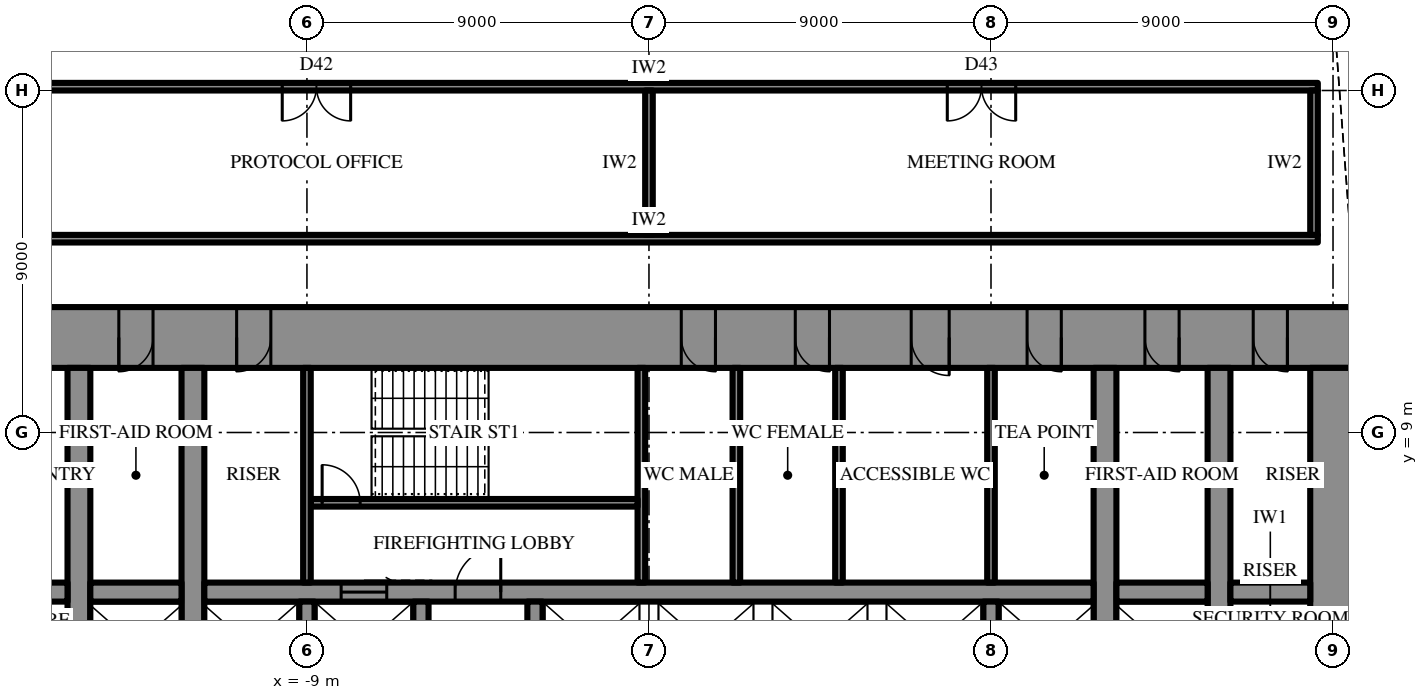
"""IFC4 building model, lengths in metres.
Left out: names, types, materials, properties, quantities, classifications, styles, units other than length and angle.
Written with IfcOpenShell. Run it as: python <this file> out.ifc"""

import sys

from ifc_helpers import new_model, si_unit, direction, frame, frame_2d, origin, place, context, subcontext, project, spatial, rectangle, extrude, element, fill, save


model = new_model("IFC4")
c1 = context("Model", 3, precision=1e-05, world=origin(), true_north=direction((0.0, 1.0)))
c2 = subcontext(c1, "Body", "Model", "MODEL_VIEW")
j1 = project(units=[si_unit("LENGTHUNIT", "METRE"), si_unit("PLANEANGLEUNIT", "RADIAN")], contexts=[c1])
p1 = place(None, origin())
s1 = spatial("IfcSite", under=j1, at=p1, CompositionType="ELEMENT")
p2 = place(p1, origin())
s2 = spatial("IfcBuilding", under=s1, at=p2, CompositionType="ELEMENT")
p3 = place(p2, frame((0.0, 0.0, 186.7)))
s3 = spatial("IfcBuildingStorey", under=s2, at=p3, CompositionType="ELEMENT", Elevation=186.7)
p4 = place(p3, frame((-18.6, 11.5, 0.0), z_axis=(0.0, 0.0, 1.0), x_axis=(1.0, 0.0, 0.0)))
e1 = element("IfcWall", 1, at=p4, inside=s3, PredefinedType="SHEAR", context=c2, shape_type="SweptSolid", body=[
    extrude(rectangle(XDim=37.2, YDim=1.6, at=frame_2d((18.6, 0.0))), origin(), (0.0, 0.0, 1.0), 4.2),
])
p5 = place(p4, frame((19.45, 0.0, 0.0)))
e2 = element("IfcOpeningElement", 2, at=p5, cuts=e1, PredefinedType="OPENING", context=c2, shape_type="SweptSolid", body=[
    extrude(rectangle(XDim=0.9, YDim=2.2, at=frame_2d((0.45, 1.1))), frame((0.0, 0.81, 0.0), z_axis=(0.0, -1.0, 0.0), x_axis=(1.0, 0.0, 0.0)), (0.0, 0.0, 1.0), 1.62),
])
p6 = place(p4, frame((22.45, 0.0, 0.0)))
e3 = element("IfcOpeningElement", 3, at=p6, cuts=e1, PredefinedType="OPENING", context=c2, shape_type="SweptSolid", body=[
    extrude(rectangle(XDim=0.9, YDim=2.2, at=frame_2d((0.45, 1.1))), frame((0.0, 0.81, 0.0), z_axis=(0.0, -1.0, 0.0), x_axis=(1.0, 0.0, 0.0)), (0.0, 0.0, 1.0), 1.62),
])
p7 = place(p4, frame((25.5, 0.0, 0.0)))
e4 = element("IfcOpeningElement", 4, at=p7, cuts=e1, PredefinedType="OPENING", context=c2, shape_type="SweptSolid", body=[
    extrude(rectangle(XDim=1.0, YDim=2.2, at=frame_2d((0.5, 1.1))), frame((0.0, 0.81, 0.0), z_axis=(0.0, -1.0, 0.0), x_axis=(1.0, 0.0, 0.0)), (0.0, 0.0, 1.0), 1.62),
])
p8 = place(p4, frame((1.8, 0.0, 0.0)))
e5 = element("IfcOpeningElement", 5, at=p8, cuts=e1, PredefinedType="OPENING", context=c2, shape_type="SweptSolid", body=[
    extrude(rectangle(XDim=0.9, YDim=2.2, at=frame_2d((0.45, 1.1))), frame((0.0, 0.81, 0.0), z_axis=(0.0, -1.0, 0.0), x_axis=(1.0, 0.0, 0.0)), (0.0, 0.0, 1.0), 1.62),
])
p9 = place(p4, frame((4.65, 0.0, 0.0)))
e6 = element("IfcOpeningElement", 6, at=p9, cuts=e1, PredefinedType="OPENING", context=c2, shape_type="SweptSolid", body=[
    extrude(rectangle(XDim=0.9, YDim=2.2, at=frame_2d((0.45, 1.1))), frame((0.0, 0.81, 0.0), z_axis=(0.0, -1.0, 0.0), x_axis=(1.0, 0.0, 0.0)), (0.0, 0.0, 1.0), 1.62),
])
p10 = place(p4, frame((7.75, 0.0, 0.0)))
e7 = element("IfcOpeningElement", 7, at=p10, cuts=e1, PredefinedType="OPENING", context=c2, shape_type="SweptSolid", body=[
    extrude(rectangle(XDim=0.9, YDim=2.2, at=frame_2d((0.45, 1.1))), frame((0.0, 0.81, 0.0), z_axis=(0.0, -1.0, 0.0), x_axis=(1.0, 0.0, 0.0)), (0.0, 0.0, 1.0), 1.62),
])
p11 = place(p4, frame((28.55, 0.0, 0.0)))
e8 = element("IfcOpeningElement", 8, at=p11, cuts=e1, PredefinedType="OPENING", context=c2, shape_type="SweptSolid", body=[
    extrude(rectangle(XDim=0.9, YDim=2.2, at=frame_2d((0.45, 1.1))), frame((0.0, 0.81, 0.0), z_axis=(0.0, -1.0, 0.0), x_axis=(1.0, 0.0, 0.0)), (0.0, 0.0, 1.0), 1.62),
])
p12 = place(p4, frame((31.65, 0.0, 0.0)))
e9 = element("IfcOpeningElement", 9, at=p12, cuts=e1, PredefinedType="OPENING", context=c2, shape_type="SweptSolid", body=[
    extrude(rectangle(XDim=0.9, YDim=2.2, at=frame_2d((0.45, 1.1))), frame((0.0, 0.81, 0.0), z_axis=(0.0, -1.0, 0.0), x_axis=(1.0, 0.0, 0.0)), (0.0, 0.0, 1.0), 1.62),
])
p13 = place(p4, frame((34.5, 0.0, 0.0)))
e10 = element("IfcOpeningElement", 10, at=p13, cuts=e1, PredefinedType="OPENING", context=c2, shape_type="SweptSolid", body=[
    extrude(rectangle(XDim=0.9, YDim=2.2, at=frame_2d((0.45, 1.1))), frame((0.0, 0.81, 0.0), z_axis=(0.0, -1.0, 0.0), x_axis=(1.0, 0.0, 0.0)), (0.0, 0.0, 1.0), 1.62),
])
p14 = place(p3, frame((18.0, -10.7, 0.0), z_axis=(0.0, 0.0, 1.0), x_axis=(0.0, 1.0, 0.0)))
e11 = element("IfcWall", 11, at=p14, inside=s3, PredefinedType="SHEAR", context=c2, shape_type="SweptSolid", body=[
    extrude(rectangle(XDim=21.4, YDim=1.2, at=frame_2d((10.7, 0.0))), origin(), (0.0, 0.0, 1.0), 4.2),
])
p15 = place(p14, frame((9.8, 0.0, 0.0)))
e12 = element("IfcOpeningElement", 12, at=p15, cuts=e11, PredefinedType="OPENING", context=c2, shape_type="SweptSolid", body=[
    extrude(rectangle(XDim=1.8, YDim=2.4, at=frame_2d((0.9, 1.2))), frame((0.0, 0.61, 0.0), z_axis=(0.0, -1.0, 0.0), x_axis=(1.0, 0.0, 0.0)), (0.0, 0.0, 1.0), 1.22),
])
p16 = place(p3, frame((12.0, -10.7, 0.0), z_axis=(0.0, 0.0, 1.0), x_axis=(0.0, 1.0, 0.0)))
e13 = element("IfcWall", 13, at=p16, inside=s3, PredefinedType="SHEAR", context=c2, shape_type="SweptSolid", body=[
    extrude(rectangle(XDim=21.4, YDim=0.6, at=frame_2d((10.7, 0.0))), origin(), (0.0, 0.0, 1.0), 4.2),
])
p17 = place(p16, frame((9.8, 0.0, 0.0)))
e14 = element("IfcOpeningElement", 14, at=p17, cuts=e13, PredefinedType="OPENING", context=c2, shape_type="SweptSolid", body=[
    extrude(rectangle(XDim=1.8, YDim=2.4, at=frame_2d((0.9, 1.2))), frame((0.0, 0.31, 0.0), z_axis=(0.0, -1.0, 0.0), x_axis=(1.0, 0.0, 0.0)), (0.0, 0.0, 1.0), 0.62),
])
p18 = place(p3, frame((-12.0, -10.7, 0.0), z_axis=(0.0, 0.0, 1.0), x_axis=(0.0, 1.0, 0.0)))
e15 = element("IfcWall", 15, at=p18, inside=s3, PredefinedType="SHEAR", context=c2, shape_type="SweptSolid", body=[
    extrude(rectangle(XDim=21.4, YDim=0.6, at=frame_2d((10.7, 0.0))), origin(), (0.0, 0.0, 1.0), 4.2),
])
p19 = place(p18, frame((9.8, 0.0, 0.0)))
e16 = element("IfcOpeningElement", 16, at=p19, cuts=e15, PredefinedType="OPENING", context=c2, shape_type="SweptSolid", body=[
    extrude(rectangle(XDim=1.8, YDim=2.4, at=frame_2d((0.9, 1.2))), frame((0.0, 0.31, 0.0), z_axis=(0.0, -1.0, 0.0), x_axis=(1.0, 0.0, 0.0)), (0.0, 0.0, 1.0), 0.62),
])
p20 = place(p3, frame((15.0, -10.7, 0.0), z_axis=(0.0, 0.0, 1.0), x_axis=(0.0, 1.0, 0.0)))
e17 = element("IfcWall", 17, at=p20, inside=s3, PredefinedType="SHEAR", context=c2, shape_type="SweptSolid", body=[
    extrude(rectangle(XDim=21.4, YDim=0.6, at=frame_2d((10.7, 0.0))), origin(), (0.0, 0.0, 1.0), 4.2),
])
p21 = place(p20, frame((9.8, 0.0, 0.0)))
e18 = element("IfcOpeningElement", 18, at=p21, cuts=e17, PredefinedType="OPENING", context=c2, shape_type="SweptSolid", body=[
    extrude(rectangle(XDim=1.8, YDim=2.4, at=frame_2d((0.9, 1.2))), frame((0.0, 0.31, 0.0), z_axis=(0.0, -1.0, 0.0), x_axis=(1.0, 0.0, 0.0)), (0.0, 0.0, 1.0), 0.62),
])
p22 = place(p3, frame((-15.0, -10.7, 0.0), z_axis=(0.0, 0.0, 1.0), x_axis=(0.0, 1.0, 0.0)))
e19 = element("IfcWall", 19, at=p22, inside=s3, PredefinedType="SHEAR", context=c2, shape_type="SweptSolid", body=[
    extrude(rectangle(XDim=21.4, YDim=0.6, at=frame_2d((10.7, 0.0))), origin(), (0.0, 0.0, 1.0), 4.2),
])
p23 = place(p22, frame((9.8, 0.0, 0.0)))
e20 = element("IfcOpeningElement", 20, at=p23, cuts=e19, PredefinedType="OPENING", context=c2, shape_type="SweptSolid", body=[
    extrude(rectangle(XDim=1.8, YDim=2.4, at=frame_2d((0.9, 1.2))), frame((0.0, 0.31, 0.0), z_axis=(0.0, -1.0, 0.0), x_axis=(1.0, 0.0, 0.0)), (0.0, 0.0, 1.0), 0.62),
])
p24 = place(p3, frame((-17.4, 4.8, 0.0), z_axis=(0.0, 0.0, 1.0), x_axis=(1.0, 0.0, 0.0)))
e21 = element("IfcWall", 21, at=p24, inside=s3, PredefinedType="SHEAR", context=c2, shape_type="SweptSolid", body=[
    extrude(rectangle(XDim=2.1, YDim=0.5, at=frame_2d((1.05, 0.0))), origin(), (0.0, 0.0, 1.0), 4.2),
])
p25 = place(p3, frame((-14.7, 4.8, 0.0), z_axis=(0.0, 0.0, 1.0), x_axis=(1.0, 0.0, 0.0)))
e22 = element("IfcWall", 22, at=p25, inside=s3, PredefinedType="SHEAR", context=c2, shape_type="SweptSolid", body=[
    extrude(rectangle(XDim=2.4, YDim=0.5, at=frame_2d((1.2, 0.0))), origin(), (0.0, 0.0, 1.0), 4.2),
])
p26 = place(p3, frame((-11.7, 4.8, 0.0), z_axis=(0.0, 0.0, 1.0), x_axis=(1.0, 0.0, 0.0)))
e23 = element("IfcWall", 23, at=p26, inside=s3, PredefinedType="SHEAR", context=c2, shape_type="SweptSolid", body=[
    extrude(rectangle(XDim=23.4, YDim=0.5, at=frame_2d((11.7, 0.0))), origin(), (0.0, 0.0, 1.0), 4.2),
])
p27 = place(p26, frame((6.6, 0.0, 0.0)))
e24 = element("IfcOpeningElement", 24, at=p27, cuts=e23, PredefinedType="OPENING", context=c2, shape_type="SweptSolid", body=[
    extrude(rectangle(XDim=1.2, YDim=2.2, at=frame_2d((0.6, 1.1))), frame((0.0, 0.26, 0.0), z_axis=(0.0, -1.0, 0.0), x_axis=(1.0, 0.0, 0.0)), (0.0, 0.0, 1.0), 0.52),
])
p28 = place(p26, frame((3.6, 0.0, 0.0)))
e25 = element("IfcOpeningElement", 25, at=p28, cuts=e23, PredefinedType="OPENING", context=c2, shape_type="SweptSolid", body=[
    extrude(rectangle(XDim=1.2, YDim=2.2, at=frame_2d((0.6, 1.1))), frame((0.0, 0.26, 0.0), z_axis=(0.0, -1.0, 0.0), x_axis=(1.0, 0.0, 0.0)), (0.0, 0.0, 1.0), 0.52),
])
p29 = place(p3, frame((12.3, 4.8, 0.0), z_axis=(0.0, 0.0, 1.0), x_axis=(1.0, 0.0, 0.0)))
e26 = element("IfcWall", 26, at=p29, inside=s3, PredefinedType="SHEAR", context=c2, shape_type="SweptSolid", body=[
    extrude(rectangle(XDim=2.4, YDim=0.5, at=frame_2d((1.2, 0.0))), origin(), (0.0, 0.0, 1.0), 4.2),
])
p30 = place(p3, frame((15.3, 4.8, 0.0), z_axis=(0.0, 0.0, 1.0), x_axis=(1.0, 0.0, 0.0)))
e27 = element("IfcWall", 27, at=p30, inside=s3, PredefinedType="SHEAR", context=c2, shape_type="SweptSolid", body=[
    extrude(rectangle(XDim=2.1, YDim=0.5, at=frame_2d((1.05, 0.0))), origin(), (0.0, 0.0, 1.0), 4.2),
])
for number, where, z_axis, x_axis in (
    (28, (-9.0, 2.25, 0.0), (0.0, 0.0, 1.0), (0.0, 1.0, 0.0)),
    (29, (-6.0, 2.25, 0.0), (0.0, 0.0, 1.0), (0.0, 1.0, 0.0)),
    (30, (-3.0, 2.25, 0.0), (0.0, 0.0, 1.0), (0.0, 1.0, 0.0)),
    (31, (9.0, 2.25, 0.0), (0.0, 0.0, 1.0), (0.0, 1.0, 0.0)),
):
    element("IfcWall", number, at=place(p3, frame(where, z_axis=z_axis, x_axis=x_axis)), inside=s3, PredefinedType="SHEAR", context=c2, shape_type="SweptSolid", body=[
        extrude(rectangle(XDim=2.3, YDim=0.4, at=frame_2d((1.15, 0.0))), origin(), (0.0, 0.0, 1.0), 4.2),
    ])
p31 = place(p3, frame((-0.2, 5.05, 0.0), z_axis=(0.0, 0.0, 1.0), x_axis=(0.0, 1.0, 0.0)))
e32 = element("IfcWall", 32, at=p31, inside=s3, PredefinedType="SHEAR", context=c2, shape_type="SweptSolid", body=[
    extrude(rectangle(XDim=5.65, YDim=0.2, at=frame_2d((2.825, 0.0))), origin(), (0.0, 0.0, 1.0), 4.2),
])
p32 = place(p3, frame((-8.9, 7.15, 0.0), z_axis=(0.0, 0.0, 1.0), x_axis=(1.0, 0.0, 0.0)))
e33 = element("IfcWall", 33, at=p32, inside=s3, PredefinedType="SHEAR", context=c2, shape_type="SweptSolid", body=[
    extrude(rectangle(XDim=8.6, YDim=0.2, at=frame_2d((4.3, 0.0))), origin(), (0.0, 0.0, 1.0), 4.2),
])
p33 = place(p32, frame((0.3, 0.0, 0.0)))
e34 = element("IfcOpeningElement", 34, at=p33, cuts=e33, PredefinedType="OPENING", context=c2, shape_type="SweptSolid", body=[
    extrude(rectangle(XDim=1.0, YDim=2.2, at=frame_2d((0.5, 1.1))), frame((0.0, 0.11, 0.0), z_axis=(0.0, -1.0, 0.0), x_axis=(1.0, 0.0, 0.0)), (0.0, 0.0, 1.0), 0.22),
])
for number, where, z_axis, x_axis in (
    (35, (-9.0, 5.05, 0.0), (0.0, 0.0, 1.0), (0.0, 1.0, 0.0)),
    (36, (9.0, 5.05, 0.0), (0.0, 0.0, 1.0), (0.0, 1.0, 0.0)),
    (37, (2.3, 5.05, 0.0), (0.0, 0.0, 1.0), (0.0, 1.0, 0.0)),
    (38, (5.0, 5.05, 0.0), (0.0, 0.0, 1.0), (0.0, 1.0, 0.0)),
):
    element("IfcWall", number, at=place(p3, frame(where, z_axis=z_axis, x_axis=x_axis)), inside=s3, PredefinedType="PARTITIONING", context=c2, shape_type="SweptSolid", body=[
        extrude(rectangle(XDim=5.65, YDim=0.2, at=frame_2d((2.825, 0.0))), origin(), (0.0, 0.0, 1.0), 4.0),
    ])
p34 = place(p3, frame((-17.6, 14.1, 0.0), z_axis=(0.0, 0.0, 1.0), x_axis=(1.0, 0.0, 0.0)))
e39 = element("IfcWall", 39, at=p34, inside=s3, PredefinedType="PARTITIONING", context=c2, shape_type="SweptSolid", body=[
    extrude(rectangle(XDim=35.2, YDim=0.2, at=frame_2d((17.6, 0.0))), origin(), (0.0, 0.0, 1.0), 4.0),
])
p35 = place(p3, frame((-17.6, 18.1, 0.0), z_axis=(0.0, 0.0, 1.0), x_axis=(1.0, 0.0, 0.0)))
e40 = element("IfcWall", 40, at=p35, inside=s3, PredefinedType="PARTITIONING", context=c2, shape_type="SweptSolid", body=[
    extrude(rectangle(XDim=35.2, YDim=0.2, at=frame_2d((17.6, 0.0))), origin(), (0.0, 0.0, 1.0), 4.0),
])
p36 = place(p35, frame((7.95, 0.0, 0.0)))
e41 = element("IfcOpeningElement", 41, at=p36, cuts=e40, PredefinedType="OPENING", context=c2, shape_type="SweptSolid", body=[
    extrude(rectangle(XDim=1.8, YDim=2.4, at=frame_2d((0.9, 1.2))), frame((0.0, 0.11, 0.0), z_axis=(0.0, -1.0, 0.0), x_axis=(1.0, 0.0, 0.0)), (0.0, 0.0, 1.0), 0.22),
])
p37 = place(p35, frame((25.45, 0.0, 0.0)))
e42 = element("IfcOpeningElement", 42, at=p37, cuts=e40, PredefinedType="OPENING", context=c2, shape_type="SweptSolid", body=[
    extrude(rectangle(XDim=1.8, YDim=2.4, at=frame_2d((0.9, 1.2))), frame((0.0, 0.11, 0.0), z_axis=(0.0, -1.0, 0.0), x_axis=(1.0, 0.0, 0.0)), (0.0, 0.0, 1.0), 0.22),
])
p38 = place(p3, frame((0.0, 14.2, 0.0), z_axis=(0.0, 0.0, 1.0), x_axis=(0.0, 1.0, 0.0)))
e43 = element("IfcWall", 43, at=p38, inside=s3, PredefinedType="PARTITIONING", context=c2, shape_type="SweptSolid", body=[
    extrude(rectangle(XDim=3.8, YDim=0.2, at=frame_2d((1.9, 0.0))), origin(), (0.0, 0.0, 1.0), 2.992),
])
p39 = place(p3, frame((17.5, 14.2, 0.0), z_axis=(0.0, 0.0, 1.0), x_axis=(0.0, 1.0, 0.0)))
e44 = element("IfcWall", 44, at=p39, inside=s3, PredefinedType="PARTITIONING", context=c2, shape_type="SweptSolid", body=[
    extrude(rectangle(XDim=3.8, YDim=0.2, at=frame_2d((1.9, 0.0))), origin(), (0.0, 0.0, 1.0), 4.0),
])
p40 = place(p3, frame((28.436, 4.747, 0.0), z_axis=(0.0, 0.0, 1.0), x_axis=(-0.499995666571, 0.866027905677, 0.0)))
e45 = element("IfcWall", 45, at=p40, inside=s3, PredefinedType="PARTITIONING", context=c2, shape_type="SweptSolid", body=[
    extrude(rectangle(XDim=20.215, YDim=0.2, at=frame_2d((10.107, 0.0))), origin(), (0.0, 0.0, 1.0), 4.0),
])
p41 = place(p40, frame((2.102, 0.0, 0.0)))
e46 = element("IfcOpeningElement", 46, at=p41, cuts=e45, PredefinedType="OPENING", context=c2, shape_type="SweptSolid", body=[
    extrude(rectangle(XDim=1.0, YDim=2.2, at=frame_2d((0.5, 1.1))), frame((0.0, 0.11, 0.0), z_axis=(0.0, -1.0, 0.0), x_axis=(1.0, 0.0, 0.0)), (0.0, 0.0, 1.0), 0.22),
])
p42 = place(p40, frame((7.105, 0.0, 0.0)))
e47 = element("IfcOpeningElement", 47, at=p42, cuts=e45, PredefinedType="OPENING", context=c2, shape_type="SweptSolid", body=[
    extrude(rectangle(XDim=1.0, YDim=2.2, at=frame_2d((0.5, 1.1))), frame((0.0, 0.11, 0.0), z_axis=(0.0, -1.0, 0.0), x_axis=(1.0, 0.0, 0.0)), (0.0, 0.0, 1.0), 0.22),
])
p43 = place(p40, frame((12.109, 0.0, 0.0)))
e48 = element("IfcOpeningElement", 48, at=p43, cuts=e45, PredefinedType="OPENING", context=c2, shape_type="SweptSolid", body=[
    extrude(rectangle(XDim=1.0, YDim=2.2, at=frame_2d((0.5, 1.1))), frame((0.0, 0.11, 0.0), z_axis=(0.0, -1.0, 0.0), x_axis=(1.0, 0.0, 0.0)), (0.0, 0.0, 1.0), 0.22),
])
p44 = place(p40, frame((17.113, 0.0, 0.0)))
e49 = element("IfcOpeningElement", 49, at=p44, cuts=e45, PredefinedType="OPENING", context=c2, shape_type="SweptSolid", body=[
    extrude(rectangle(XDim=1.0, YDim=2.2, at=frame_2d((0.5, 1.1))), frame((0.0, 0.11, 0.0), z_axis=(0.0, -1.0, 0.0), x_axis=(1.0, 0.0, 0.0)), (0.0, 0.0, 1.0), 0.22),
])
p45 = place(p27, origin())
e50 = element("IfcDoor", 50, at=p45, inside=s3, OperationType="SINGLE_SWING_LEFT", PredefinedType="DOOR", context=c2, shape_type="SweptSolid", body=[
    extrude(rectangle(XDim=1.2, YDim=2.2, at=frame_2d((0.6, 1.1))), frame((0.0, 0.025, 0.0), z_axis=(0.0, -1.0, 0.0), x_axis=(1.0, 0.0, 0.0)), (0.0, 0.0, 1.0), 0.05),
])
fill(e24, e50)
p46 = place(p33, origin())
e51 = element("IfcDoor", 51, at=p46, inside=s3, OperationType="SINGLE_SWING_RIGHT", PredefinedType="DOOR", context=c2, shape_type="SweptSolid", body=[
    extrude(rectangle(XDim=1.0, YDim=2.2, at=frame_2d((0.5, 1.1))), frame((0.0, 0.025, 0.0), z_axis=(0.0, -1.0, 0.0), x_axis=(1.0, 0.0, 0.0)), (0.0, 0.0, 1.0), 0.05),
])
fill(e34, e51)
p47 = place(p5, frame((0.9, 0.0, 0.0), z_axis=(0.0, 0.0, 1.0), x_axis=(-1.0, 0.0, 0.0)))
e52 = element("IfcDoor", 52, at=p47, inside=s3, OperationType="SINGLE_SWING_RIGHT", PredefinedType="DOOR", context=c2, shape_type="SweptSolid", body=[
    extrude(rectangle(XDim=0.9, YDim=2.2, at=frame_2d((0.45, 1.1))), frame((0.0, 0.025, 0.0), z_axis=(0.0, -1.0, 0.0), x_axis=(1.0, 0.0, 0.0)), (0.0, 0.0, 1.0), 0.05),
])
fill(e2, e52)
p48 = place(p6, frame((0.9, 0.0, 0.0), z_axis=(0.0, 0.0, 1.0), x_axis=(-1.0, 0.0, 0.0)))
e53 = element("IfcDoor", 53, at=p48, inside=s3, OperationType="SINGLE_SWING_RIGHT", PredefinedType="DOOR", context=c2, shape_type="SweptSolid", body=[
    extrude(rectangle(XDim=0.9, YDim=2.2, at=frame_2d((0.45, 1.1))), frame((0.0, 0.025, 0.0), z_axis=(0.0, -1.0, 0.0), x_axis=(1.0, 0.0, 0.0)), (0.0, 0.0, 1.0), 0.05),
])
fill(e3, e53)
p49 = place(p7, frame((1.0, 0.0, 0.0), z_axis=(0.0, 0.0, 1.0), x_axis=(-1.0, 0.0, 0.0)))
e54 = element("IfcDoor", 54, at=p49, inside=s3, OperationType="SINGLE_SWING_RIGHT", PredefinedType="DOOR", context=c2, shape_type="SweptSolid", body=[
    extrude(rectangle(XDim=1.0, YDim=2.2, at=frame_2d((0.5, 1.1))), frame((0.0, 0.025, 0.0), z_axis=(0.0, -1.0, 0.0), x_axis=(1.0, 0.0, 0.0)), (0.0, 0.0, 1.0), 0.05),
])
fill(e4, e54)
p50 = place(p9, frame((0.9, 0.0, 0.0), z_axis=(0.0, 0.0, 1.0), x_axis=(-1.0, 0.0, 0.0)))
e55 = element("IfcDoor", 55, at=p50, inside=s3, OperationType="SINGLE_SWING_LEFT", PredefinedType="DOOR", context=c2, shape_type="SweptSolid", body=[
    extrude(rectangle(XDim=0.9, YDim=2.2, at=frame_2d((0.45, 1.1))), frame((0.0, 0.025, 0.0), z_axis=(0.0, -1.0, 0.0), x_axis=(1.0, 0.0, 0.0)), (0.0, 0.0, 1.0), 0.05),
])
fill(e6, e55)
p51 = place(p10, frame((0.9, 0.0, 0.0), z_axis=(0.0, 0.0, 1.0), x_axis=(-1.0, 0.0, 0.0)))
e56 = element("IfcDoor", 56, at=p51, inside=s3, OperationType="SINGLE_SWING_LEFT", PredefinedType="DOOR", context=c2, shape_type="SweptSolid", body=[
    extrude(rectangle(XDim=0.9, YDim=2.2, at=frame_2d((0.45, 1.1))), frame((0.0, 0.025, 0.0), z_axis=(0.0, -1.0, 0.0), x_axis=(1.0, 0.0, 0.0)), (0.0, 0.0, 1.0), 0.05),
])
fill(e7, e56)
p52 = place(p11, frame((0.9, 0.0, 0.0), z_axis=(0.0, 0.0, 1.0), x_axis=(-1.0, 0.0, 0.0)))
e57 = element("IfcDoor", 57, at=p52, inside=s3, OperationType="SINGLE_SWING_RIGHT", PredefinedType="DOOR", context=c2, shape_type="SweptSolid", body=[
    extrude(rectangle(XDim=0.9, YDim=2.2, at=frame_2d((0.45, 1.1))), frame((0.0, 0.025, 0.0), z_axis=(0.0, -1.0, 0.0), x_axis=(1.0, 0.0, 0.0)), (0.0, 0.0, 1.0), 0.05),
])
fill(e8, e57)
p53 = place(p12, frame((0.9, 0.0, 0.0), z_axis=(0.0, 0.0, 1.0), x_axis=(-1.0, 0.0, 0.0)))
e58 = element("IfcDoor", 58, at=p53, inside=s3, OperationType="SINGLE_SWING_RIGHT", PredefinedType="DOOR", context=c2, shape_type="SweptSolid", body=[
    extrude(rectangle(XDim=0.9, YDim=2.2, at=frame_2d((0.45, 1.1))), frame((0.0, 0.025, 0.0), z_axis=(0.0, -1.0, 0.0), x_axis=(1.0, 0.0, 0.0)), (0.0, 0.0, 1.0), 0.05),
])
fill(e9, e58)
p54 = place(p13, frame((0.9, 0.0, 0.0), z_axis=(0.0, 0.0, 1.0), x_axis=(-1.0, 0.0, 0.0)))
e59 = element("IfcDoor", 59, at=p54, inside=s3, OperationType="SINGLE_SWING_RIGHT", PredefinedType="DOOR", context=c2, shape_type="SweptSolid", body=[
    extrude(rectangle(XDim=0.9, YDim=2.2, at=frame_2d((0.45, 1.1))), frame((0.0, 0.025, 0.0), z_axis=(0.0, -1.0, 0.0), x_axis=(1.0, 0.0, 0.0)), (0.0, 0.0, 1.0), 0.05),
])
fill(e10, e59)
p55 = place(p28, origin())
e60 = element("IfcDoor", 60, at=p55, inside=s3, OperationType="SLIDING_TO_LEFT", PredefinedType="DOOR", context=c2, shape_type="SweptSolid", body=[
    extrude(rectangle(XDim=1.2, YDim=2.2, at=frame_2d((0.6, 1.1))), frame((0.0, 0.025, 0.0), z_axis=(0.0, -1.0, 0.0), x_axis=(1.0, 0.0, 0.0)), (0.0, 0.0, 1.0), 0.05),
])
fill(e25, e60)
p56 = place(p36, frame((1.8, 0.0, 0.0), z_axis=(0.0, 0.0, 1.0), x_axis=(-1.0, 0.0, 0.0)))
e61 = element("IfcDoor", 61, at=p56, inside=s3, OperationType="DOUBLE_DOOR_SINGLE_SWING", PredefinedType="DOOR", context=c2, shape_type="SweptSolid", body=[
    extrude(rectangle(XDim=1.8, YDim=2.4, at=frame_2d((0.9, 1.2))), frame((0.0, 0.025, 0.0), z_axis=(0.0, -1.0, 0.0), x_axis=(1.0, 0.0, 0.0)), (0.0, 0.0, 1.0), 0.05),
])
fill(e41, e61)
p57 = place(p37, frame((1.8, 0.0, 0.0), z_axis=(0.0, 0.0, 1.0), x_axis=(-1.0, 0.0, 0.0)))
e62 = element("IfcDoor", 62, at=p57, inside=s3, OperationType="DOUBLE_DOOR_SINGLE_SWING", PredefinedType="DOOR", context=c2, shape_type="SweptSolid", body=[
    extrude(rectangle(XDim=1.8, YDim=2.4, at=frame_2d((0.9, 1.2))), frame((0.0, 0.025, 0.0), z_axis=(0.0, -1.0, 0.0), x_axis=(1.0, 0.0, 0.0)), (0.0, 0.0, 1.0), 0.05),
])
fill(e42, e62)
save(model, sys.argv[1])
